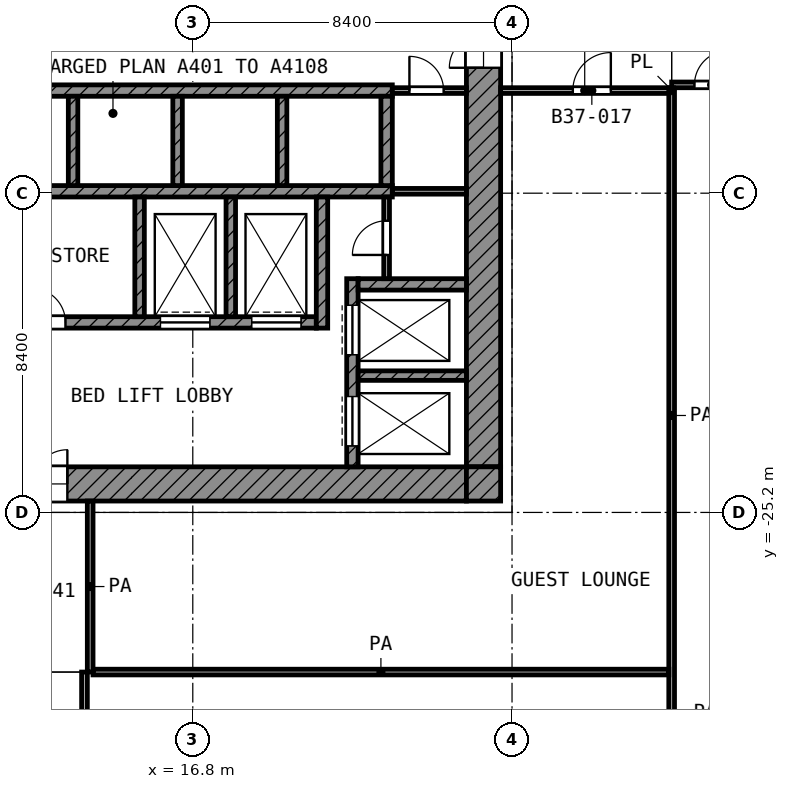
"""IFC4 building model, lengths in metres.
Left out: names, types, materials, properties, quantities, classifications, styles, units other than length and angle.
Written with IfcOpenShell. Run it as: python <this file> out.ifc"""

import sys

from ifc_helpers import new_model, si_unit, direction, frame, frame_2d, origin, place, context, subcontext, project, spatial, rectangle, extrude, element, fill, save


model = new_model("IFC4")
c1 = context("Model", 3, precision=1e-05, world=origin(), true_north=direction((0.0, 1.0)))
c2 = subcontext(c1, "Body", "Model", "MODEL_VIEW")
j1 = project(units=[si_unit("LENGTHUNIT", "METRE"), si_unit("PLANEANGLEUNIT", "RADIAN")], contexts=[c1])
p1 = place(None, origin())
s1 = spatial("IfcSite", under=j1, at=p1, CompositionType="ELEMENT")
p2 = place(p1, origin())
s2 = spatial("IfcBuilding", under=s1, at=p2, CompositionType="ELEMENT")
p3 = place(p2, frame((0.0, 0.0, 162.6)))
s3 = spatial("IfcBuildingStorey", under=s2, at=p3, CompositionType="ELEMENT", Elevation=162.6)
p4 = place(p3, frame((24.45, -24.0, 0.0), z_axis=(0.0, 0.0, 1.0), x_axis=(0.0, 1.0, 0.0)))
e1 = element("IfcWall", 1, at=p4, inside=s3, PredefinedType="SHEAR", context=c2, shape_type="SweptSolid", body=[
    extrude(rectangle(XDim=18.6, YDim=0.9, at=frame_2d((9.3, 0.0))), origin(), (0.0, 0.0, 1.0), 3.6),
])
p5 = place(p4, frame((10.5, 0.0, 0.0)))
e2 = element("IfcOpeningElement", 2, at=p5, cuts=e1, PredefinedType="OPENING", context=c2, shape_type="SweptSolid", body=[
    extrude(rectangle(XDim=1.8, YDim=2.1, at=frame_2d((0.9, 1.05))), frame((0.0, 0.46, 0.0), z_axis=(0.0, -1.0, 0.0), x_axis=(1.0, 0.0, 0.0)), (0.0, 0.0, 1.0), 0.92),
])
p6 = place(p3, frame((5.4, -24.45, 0.0), z_axis=(0.0, 0.0, 1.0), x_axis=(1.0, 0.0, 0.0)))
e3 = element("IfcWall", 3, at=p6, inside=s3, PredefinedType="SHEAR", context=c2, shape_type="SweptSolid", body=[
    extrude(rectangle(XDim=18.6, YDim=0.9, at=frame_2d((9.3, 0.0))), origin(), (0.0, 0.0, 1.0), 3.6),
])
p7 = place(p6, frame((6.3, 0.0, 0.0)))
e4 = element("IfcOpeningElement", 4, at=p7, cuts=e3, PredefinedType="OPENING", context=c2, shape_type="SweptSolid", body=[
    extrude(rectangle(XDim=1.8, YDim=2.1, at=frame_2d((0.9, 1.05))), frame((0.0, 0.46, 0.0), z_axis=(0.0, -1.0, 0.0), x_axis=(1.0, 0.0, 0.0)), (0.0, 0.0, 1.0), 0.92),
])
p8 = place(p3, frame((24.45, -24.9, 0.0), z_axis=(0.0, 0.0, 1.0), x_axis=(0.0, 1.0, 0.0)))
e5 = element("IfcWall", 5, at=p8, inside=s3, PredefinedType="SHEAR", context=c2, shape_type="SweptSolid", body=[
    extrude(rectangle(XDim=0.9, YDim=0.9, at=frame_2d((0.45, 0.0))), origin(), (0.0, 0.0, 1.0), 3.6),
])
p9 = place(p3, frame((5.4, -14.1, 0.0), z_axis=(0.0, 0.0, 1.0), x_axis=(1.0, 0.0, 0.0)))
e6 = element("IfcWall", 6, at=p9, inside=s3, PredefinedType="SHEAR", context=c2, shape_type="SweptSolid", body=[
    extrude(rectangle(XDim=16.65, YDim=0.3, at=frame_2d((8.325, 0.0))), origin(), (0.0, 0.0, 1.0), 3.6),
])
p10 = place(p9, frame((0.825, 0.0, 0.0)))
e7 = element("IfcOpeningElement", 7, at=p10, cuts=e6, PredefinedType="OPENING", context=c2, shape_type="SweptSolid", body=[
    extrude(rectangle(XDim=1.1, YDim=2.1, at=frame_2d((0.55, 1.05))), frame((0.0, 0.16, 0.0), z_axis=(0.0, -1.0, 0.0), x_axis=(1.0, 0.0, 0.0)), (0.0, 0.0, 1.0), 0.32),
])
p11 = place(p9, frame((3.575, 0.0, 0.0)))
e8 = element("IfcOpeningElement", 8, at=p11, cuts=e6, PredefinedType="OPENING", context=c2, shape_type="SweptSolid", body=[
    extrude(rectangle(XDim=1.1, YDim=2.1, at=frame_2d((0.55, 1.05))), frame((0.0, 0.16, 0.0), z_axis=(0.0, -1.0, 0.0), x_axis=(1.0, 0.0, 0.0)), (0.0, 0.0, 1.0), 0.32),
])
p12 = place(p3, frame((5.4, -16.75, 0.0), z_axis=(0.0, 0.0, 1.0), x_axis=(1.0, 0.0, 0.0)))
e9 = element("IfcWall", 9, at=p12, inside=s3, PredefinedType="SHEAR", context=c2, shape_type="SweptSolid", body=[
    extrude(rectangle(XDim=16.65, YDim=0.3, at=frame_2d((8.325, 0.0))), origin(), (0.0, 0.0, 1.0), 3.6),
])
p13 = place(p3, frame((5.4, -20.2, 0.0), z_axis=(0.0, 0.0, 1.0), x_axis=(1.0, 0.0, 0.0)))
e10 = element("IfcWall", 10, at=p13, inside=s3, PredefinedType="SHEAR", context=c2, shape_type="SweptSolid", body=[
    extrude(rectangle(XDim=14.65, YDim=0.3, at=frame_2d((7.325, 0.0))), origin(), (0.0, 0.0, 1.0), 3.6),
])
p14 = place(p13, frame((10.55, 0.0, 0.0)))
e11 = element("IfcOpeningElement", 11, at=p14, cuts=e10, PredefinedType="OPENING", context=c2, shape_type="SweptSolid", body=[
    extrude(rectangle(XDim=1.3, YDim=2.1, at=frame_2d((0.65, 1.05))), frame((0.0, 0.16, 0.0), z_axis=(0.0, -1.0, 0.0), x_axis=(1.0, 0.0, 0.0)), (0.0, 0.0, 1.0), 0.32),
])
p15 = place(p13, frame((12.95, 0.0, 0.0)))
e12 = element("IfcOpeningElement", 12, at=p15, cuts=e10, PredefinedType="OPENING", context=c2, shape_type="SweptSolid", body=[
    extrude(rectangle(XDim=1.3, YDim=2.1, at=frame_2d((0.65, 1.05))), frame((0.0, 0.16, 0.0), z_axis=(0.0, -1.0, 0.0), x_axis=(1.0, 0.0, 0.0)), (0.0, 0.0, 1.0), 0.32),
])
p16 = place(p13, frame((0.55, 0.0, 0.0)))
e13 = element("IfcOpeningElement", 13, at=p16, cuts=e10, PredefinedType="OPENING", context=c2, shape_type="SweptSolid", body=[
    extrude(rectangle(XDim=1.3, YDim=2.1, at=frame_2d((0.65, 1.05))), frame((0.0, 0.16, 0.0), z_axis=(0.0, -1.0, 0.0), x_axis=(1.0, 0.0, 0.0)), (0.0, 0.0, 1.0), 0.32),
])
p17 = place(p13, frame((2.95, 0.0, 0.0)))
e14 = element("IfcOpeningElement", 14, at=p17, cuts=e10, PredefinedType="OPENING", context=c2, shape_type="SweptSolid", body=[
    extrude(rectangle(XDim=1.3, YDim=2.1, at=frame_2d((0.65, 1.05))), frame((0.0, 0.16, 0.0), z_axis=(0.0, -1.0, 0.0), x_axis=(1.0, 0.0, 0.0)), (0.0, 0.0, 1.0), 0.32),
])
p18 = place(p13, frame((7.15, 0.0, 0.0)))
e15 = element("IfcOpeningElement", 15, at=p18, cuts=e10, PredefinedType="OPENING", context=c2, shape_type="SweptSolid", body=[
    extrude(rectangle(XDim=0.9, YDim=2.1, at=frame_2d((0.45, 1.05))), frame((0.0, 0.16, 0.0), z_axis=(0.0, -1.0, 0.0), x_axis=(1.0, 0.0, 0.0)), (0.0, 0.0, 1.0), 0.32),
])
p19 = place(p3, frame((20.2, -20.35, 0.0), z_axis=(0.0, 0.0, 1.0), x_axis=(0.0, 1.0, 0.0)))
e16 = element("IfcWall", 16, at=p19, inside=s3, PredefinedType="SHEAR", context=c2, shape_type="SweptSolid", body=[
    extrude(rectangle(XDim=3.45, YDim=0.3, at=frame_2d((1.725, 0.0))), origin(), (0.0, 0.0, 1.0), 3.6),
])
p20 = place(p3, frame((21.9, -16.6, 0.0), z_axis=(0.0, 0.0, 1.0), x_axis=(0.0, 1.0, 0.0)))
e17 = element("IfcWall", 17, at=p20, inside=s3, PredefinedType="SHEAR", context=c2, shape_type="SweptSolid", body=[
    extrude(rectangle(XDim=2.35, YDim=0.3, at=frame_2d((1.175, 0.0))), origin(), (0.0, 0.0, 1.0), 3.6),
])
p21 = place(p3, frame((21.15, -19.2, 0.0), z_axis=(0.0, 0.0, 1.0), x_axis=(1.0, 0.0, 0.0)))
e18 = element("IfcWall", 18, at=p21, inside=s3, PredefinedType="SHEAR", context=c2, shape_type="SweptSolid", body=[
    extrude(rectangle(XDim=2.85, YDim=0.3, at=frame_2d((1.425, 0.0))), origin(), (0.0, 0.0, 1.0), 3.6),
])
p22 = place(p3, frame((21.0, -24.0, 0.0), z_axis=(0.0, 0.0, 1.0), x_axis=(0.0, 1.0, 0.0)))
e19 = element("IfcWall", 19, at=p22, inside=s3, PredefinedType="SHEAR", context=c2, shape_type="SweptSolid", body=[
    extrude(rectangle(XDim=4.95, YDim=0.3, at=frame_2d((2.475, 0.0))), origin(), (0.0, 0.0, 1.0), 3.6),
])
p23 = place(p22, frame((2.95, 0.0, 0.0)))
e20 = element("IfcOpeningElement", 20, at=p23, cuts=e19, PredefinedType="OPENING", context=c2, shape_type="SweptSolid", body=[
    extrude(rectangle(XDim=1.3, YDim=2.1, at=frame_2d((0.65, 1.05))), frame((0.0, 0.16, 0.0), z_axis=(0.0, -1.0, 0.0), x_axis=(1.0, 0.0, 0.0)), (0.0, 0.0, 1.0), 0.32),
])
p24 = place(p22, frame((0.55, 0.0, 0.0)))
e21 = element("IfcOpeningElement", 21, at=p24, cuts=e19, PredefinedType="OPENING", context=c2, shape_type="SweptSolid", body=[
    extrude(rectangle(XDim=1.3, YDim=2.1, at=frame_2d((0.65, 1.05))), frame((0.0, 0.16, 0.0), z_axis=(0.0, -1.0, 0.0), x_axis=(1.0, 0.0, 0.0)), (0.0, 0.0, 1.0), 0.32),
])
p25 = place(p3, frame((21.15, -21.6, 0.0), z_axis=(0.0, 0.0, 1.0), x_axis=(1.0, 0.0, 0.0)))
e22 = element("IfcWall", 22, at=p25, inside=s3, PredefinedType="SHEAR", context=c2, shape_type="SweptSolid", body=[
    extrude(rectangle(XDim=2.85, YDim=0.25, at=frame_2d((1.425, 0.0))), origin(), (0.0, 0.0, 1.0), 3.6),
])
for number, where, z_axis, x_axis in (
    (23, (15.4, -20.05, 0.0), (0.0, 0.0, 1.0), (0.0, 1.0, 0.0)),
    (24, (17.8, -20.05, 0.0), (0.0, 0.0, 1.0), (0.0, 1.0, 0.0)),
):
    element("IfcWall", number, at=place(p3, frame(where, z_axis=z_axis, x_axis=x_axis)), inside=s3, PredefinedType="SHEAR", context=c2, shape_type="SweptSolid", body=[
        extrude(rectangle(XDim=3.15, YDim=0.25, at=frame_2d((1.575, 0.0))), origin(), (0.0, 0.0, 1.0), 3.6),
    ])
for number, where, z_axis, x_axis in (
    (25, (13.65, -16.6, 0.0), (0.0, 0.0, 1.0), (0.0, 1.0, 0.0)),
    (26, (16.4, -16.6, 0.0), (0.0, 0.0, 1.0), (0.0, 1.0, 0.0)),
    (27, (19.15, -16.6, 0.0), (0.0, 0.0, 1.0), (0.0, 1.0, 0.0)),
):
    element("IfcWall", number, at=place(p3, frame(where, z_axis=z_axis, x_axis=x_axis)), inside=s3, PredefinedType="SHEAR", context=c2, shape_type="SweptSolid", body=[
        extrude(rectangle(XDim=2.35, YDim=0.25, at=frame_2d((1.175, 0.0))), origin(), (0.0, 0.0, 1.0), 3.6),
    ])
p26 = place(p3, frame((21.9, -19.05, 0.0), z_axis=(0.0, 0.0, 1.0), x_axis=(0.0, 1.0, 0.0)))
e28 = element("IfcWall", 28, at=p26, inside=s3, PredefinedType="PARTITIONING", context=c2, shape_type="SweptSolid", body=[
    extrude(rectangle(XDim=2.15, YDim=0.15, at=frame_2d((1.075, 0.0))), origin(), (0.0, 0.0, 1.0), 3.6),
])
p27 = place(p26, frame((0.625, 0.0, 0.0)))
e29 = element("IfcOpeningElement", 29, at=p27, cuts=e28, PredefinedType="OPENING", context=c2, shape_type="SweptSolid", body=[
    extrude(rectangle(XDim=0.9, YDim=2.1, at=frame_2d((0.45, 1.05))), frame((0.0, 0.085, 0.0), z_axis=(0.0, -1.0, 0.0), x_axis=(1.0, 0.0, 0.0)), (0.0, 0.0, 1.0), 0.17),
])
p28 = place(p3, frame((22.05, -16.75, 0.0), z_axis=(0.0, 0.0, 1.0), x_axis=(1.0, 0.0, 0.0)))
e30 = element("IfcWall", 30, at=p28, inside=s3, PredefinedType="PARTITIONING", context=c2, shape_type="SweptSolid", body=[
    extrude(rectangle(XDim=1.95, YDim=0.15, at=frame_2d((0.975, 0.0))), origin(), (0.0, 0.0, 1.0), 3.6),
])
p29 = place(p3, frame((22.05, -14.1, 0.0), z_axis=(0.0, 0.0, 1.0), x_axis=(1.0, 0.0, 0.0)))
e31 = element("IfcWall", 31, at=p29, inside=s3, PredefinedType="PARTITIONING", context=c2, shape_type="SweptSolid", body=[
    extrude(rectangle(XDim=1.95, YDim=0.15, at=frame_2d((0.975, 0.0))), origin(), (0.0, 0.0, 1.0), 3.6),
])
p30 = place(p29, frame((0.45, 0.0, 0.0)))
e32 = element("IfcOpeningElement", 32, at=p30, cuts=e31, PredefinedType="OPENING", context=c2, shape_type="SweptSolid", body=[
    extrude(rectangle(XDim=0.9, YDim=2.1, at=frame_2d((0.45, 1.05))), frame((0.0, 0.085, 0.0), z_axis=(0.0, -1.0, 0.0), x_axis=(1.0, 0.0, 0.0)), (0.0, 0.0, 1.0), 0.17),
])
p31 = place(p3, frame((29.4, -14.147, 0.0), z_axis=(0.0, 0.0, 1.0), x_axis=(0.0, 1.0, 0.0)))
e33 = element("IfcWall", 33, at=p31, inside=s3, PredefinedType="PARTITIONING", context=c2, shape_type="SweptSolid", body=[
    extrude(rectangle(XDim=0.12, YDim=0.1, at=frame_2d((0.06, 0.0))), origin(), (0.0, 0.0, 1.0), 3.6),
])
p32 = place(p3, frame((14.175, -29.4, 0.0), z_axis=(0.0, 0.0, 1.0), x_axis=(1.0, 0.0, 0.0)))
e34 = element("IfcWall", 34, at=p32, inside=s3, PredefinedType="PARTITIONING", context=c2, shape_type="SweptSolid", body=[
    extrude(rectangle(XDim=15.15, YDim=0.15, at=frame_2d((7.575, 0.0))), origin(), (0.0, 0.0, 1.0), 3.6),
])
p33 = place(p3, frame((24.9, -14.1, 0.0), z_axis=(0.0, 0.0, 1.0), x_axis=(1.0, 0.0, 0.0)))
e35 = element("IfcWall", 35, at=p33, inside=s3, PredefinedType="PARTITIONING", context=c2, shape_type="SweptSolid", body=[
    extrude(rectangle(XDim=4.425, YDim=0.15, at=frame_2d((2.212, 0.0))), origin(), (0.0, 0.0, 1.0), 3.6),
])
p34 = place(p33, frame((1.9, 0.0, 0.0)))
e36 = element("IfcOpeningElement", 36, at=p34, cuts=e35, PredefinedType="OPENING", context=c2, shape_type="SweptSolid", body=[
    extrude(rectangle(XDim=1.0, YDim=2.1, at=frame_2d((0.5, 1.05))), frame((0.0, 0.085, 0.0), z_axis=(0.0, -1.0, 0.0), x_axis=(1.0, 0.0, 0.0)), (0.0, 0.0, 1.0), 0.17),
])
p35 = place(p3, frame((29.4, -13.95, 0.0), z_axis=(0.0, 0.0, 1.0), x_axis=(1.0, 0.0, 0.0)))
e37 = element("IfcWall", 37, at=p35, inside=s3, PredefinedType="PARTITIONING", context=c2, shape_type="SweptSolid", body=[
    extrude(rectangle(XDim=37.72, YDim=0.15, at=frame_2d((18.86, 0.0))), origin(), (0.0, 0.0, 1.0), 3.6),
])
p36 = place(p35, frame((14.6, 0.0, 0.0)))
e38 = element("IfcOpeningElement", 38, at=p36, cuts=e37, PredefinedType="OPENING", context=c2, shape_type="SweptSolid", body=[
    extrude(rectangle(XDim=1.0, YDim=2.1, at=frame_2d((0.5, 1.05))), frame((0.0, 0.085, 0.0), z_axis=(0.0, -1.0, 0.0), x_axis=(1.0, 0.0, 0.0)), (0.0, 0.0, 1.0), 0.17),
])
p37 = place(p35, frame((12.3, 0.0, 0.0)))
e39 = element("IfcOpeningElement", 39, at=p37, cuts=e37, PredefinedType="OPENING", context=c2, shape_type="SweptSolid", body=[
    extrude(rectangle(XDim=1.0, YDim=2.1, at=frame_2d((0.5, 1.05))), frame((0.0, 0.085, 0.0), z_axis=(0.0, -1.0, 0.0), x_axis=(1.0, 0.0, 0.0)), (0.0, 0.0, 1.0), 0.17),
])
p38 = place(p35, frame((18.7, 0.0, 0.0)))
e40 = element("IfcOpeningElement", 40, at=p38, cuts=e37, PredefinedType="OPENING", context=c2, shape_type="SweptSolid", body=[
    extrude(rectangle(XDim=1.0, YDim=2.1, at=frame_2d((0.5, 1.05))), frame((0.0, 0.085, 0.0), z_axis=(0.0, -1.0, 0.0), x_axis=(1.0, 0.0, 0.0)), (0.0, 0.0, 1.0), 0.17),
])
p39 = place(p35, frame((22.6, 0.0, 0.0)))
e41 = element("IfcOpeningElement", 41, at=p39, cuts=e37, PredefinedType="OPENING", context=c2, shape_type="SweptSolid", body=[
    extrude(rectangle(XDim=1.0, YDim=2.1, at=frame_2d((0.5, 1.05))), frame((0.0, 0.085, 0.0), z_axis=(0.0, -1.0, 0.0), x_axis=(1.0, 0.0, 0.0)), (0.0, 0.0, 1.0), 0.17),
])
p40 = place(p35, frame((26.8, 0.0, 0.0)))
e42 = element("IfcOpeningElement", 42, at=p40, cuts=e37, PredefinedType="OPENING", context=c2, shape_type="SweptSolid", body=[
    extrude(rectangle(XDim=1.0, YDim=2.1, at=frame_2d((0.5, 1.05))), frame((0.0, 0.085, 0.0), z_axis=(0.0, -1.0, 0.0), x_axis=(1.0, 0.0, 0.0)), (0.0, 0.0, 1.0), 0.17),
])
p41 = place(p35, frame((36.0, 0.0, 0.0)))
e43 = element("IfcOpeningElement", 43, at=p41, cuts=e37, PredefinedType="OPENING", context=c2, shape_type="SweptSolid", body=[
    extrude(rectangle(XDim=1.0, YDim=2.1, at=frame_2d((0.5, 1.05))), frame((0.0, 0.085, 0.0), z_axis=(0.0, -1.0, 0.0), x_axis=(1.0, 0.0, 0.0)), (0.0, 0.0, 1.0), 0.17),
])
p42 = place(p35, frame((34.7, 0.0, 0.0)))
e44 = element("IfcOpeningElement", 44, at=p42, cuts=e37, PredefinedType="OPENING", context=c2, shape_type="SweptSolid", body=[
    extrude(rectangle(XDim=1.0, YDim=2.1, at=frame_2d((0.5, 1.05))), frame((0.0, 0.085, 0.0), z_axis=(0.0, -1.0, 0.0), x_axis=(1.0, 0.0, 0.0)), (0.0, 0.0, 1.0), 0.17),
])
p43 = place(p35, frame((0.6, 0.0, 0.0)))
e45 = element("IfcOpeningElement", 45, at=p43, cuts=e37, PredefinedType="OPENING", context=c2, shape_type="SweptSolid", body=[
    extrude(rectangle(XDim=0.9, YDim=2.1, at=frame_2d((0.45, 1.05))), frame((0.0, 0.085, 0.0), z_axis=(0.0, -1.0, 0.0), x_axis=(1.0, 0.0, 0.0)), (0.0, 0.0, 1.0), 0.17),
])
p44 = place(p35, frame((2.65, 0.0, 0.0)))
e46 = element("IfcOpeningElement", 46, at=p44, cuts=e37, PredefinedType="OPENING", context=c2, shape_type="SweptSolid", body=[
    extrude(rectangle(XDim=1.0, YDim=2.1, at=frame_2d((0.5, 1.05))), frame((0.0, 0.085, 0.0), z_axis=(0.0, -1.0, 0.0), x_axis=(1.0, 0.0, 0.0)), (0.0, 0.0, 1.0), 0.17),
])
p45 = place(p35, frame((5.55, 0.0, 0.0)))
e47 = element("IfcOpeningElement", 47, at=p45, cuts=e37, PredefinedType="OPENING", context=c2, shape_type="SweptSolid", body=[
    extrude(rectangle(XDim=1.5, YDim=2.1, at=frame_2d((0.75, 1.05))), frame((0.0, 0.085, 0.0), z_axis=(0.0, -1.0, 0.0), x_axis=(1.0, 0.0, 0.0)), (0.0, 0.0, 1.0), 0.17),
])
p46 = place(p3, frame((13.95, -58.72, 0.0), z_axis=(0.0, 0.0, 1.0), x_axis=(0.0, 1.0, 0.0)))
e48 = element("IfcWall", 48, at=p46, inside=s3, PredefinedType="PARTITIONING", context=c2, shape_type="SweptSolid", body=[
    extrude(rectangle(XDim=29.32, YDim=0.15, at=frame_2d((14.66, 0.0))), origin(), (0.0, 0.0, 1.0), 3.6),
])
p47 = place(p46, frame((24.37, 0.0, 0.0)))
e49 = element("IfcOpeningElement", 49, at=p47, cuts=e48, PredefinedType="OPENING", context=c2, shape_type="SweptSolid", body=[
    extrude(rectangle(XDim=1.5, YDim=2.1, at=frame_2d((0.75, 1.05))), frame((0.0, 0.085, 0.0), z_axis=(0.0, -1.0, 0.0), x_axis=(1.0, 0.0, 0.0)), (0.0, 0.0, 1.0), 0.17),
])
p48 = place(p46, frame((17.62, 0.0, 0.0)))
e50 = element("IfcOpeningElement", 50, at=p48, cuts=e48, PredefinedType="OPENING", context=c2, shape_type="SweptSolid", body=[
    extrude(rectangle(XDim=1.0, YDim=2.1, at=frame_2d((0.5, 1.05))), frame((0.0, 0.085, 0.0), z_axis=(0.0, -1.0, 0.0), x_axis=(1.0, 0.0, 0.0)), (0.0, 0.0, 1.0), 0.17),
])
p49 = place(p46, frame((15.32, 0.0, 0.0)))
e51 = element("IfcOpeningElement", 51, at=p49, cuts=e48, PredefinedType="OPENING", context=c2, shape_type="SweptSolid", body=[
    extrude(rectangle(XDim=1.0, YDim=2.1, at=frame_2d((0.5, 1.05))), frame((0.0, 0.085, 0.0), z_axis=(0.0, -1.0, 0.0), x_axis=(1.0, 0.0, 0.0)), (0.0, 0.0, 1.0), 0.17),
])
p50 = place(p46, frame((5.17, 0.0, 0.0)))
e52 = element("IfcOpeningElement", 52, at=p50, cuts=e48, PredefinedType="OPENING", context=c2, shape_type="SweptSolid", body=[
    extrude(rectangle(XDim=1.5, YDim=2.1, at=frame_2d((0.75, 1.05))), frame((0.0, 0.085, 0.0), z_axis=(0.0, -1.0, 0.0), x_axis=(1.0, 0.0, 0.0)), (0.0, 0.0, 1.0), 0.17),
])
p51 = place(p3, frame((14.1, -29.4, 0.0), z_axis=(0.0, 0.0, 1.0), x_axis=(0.0, 1.0, 0.0)))
e53 = element("IfcWall", 53, at=p51, inside=s3, PredefinedType="PARTITIONING", context=c2, shape_type="SweptSolid", body=[
    extrude(rectangle(XDim=4.5, YDim=0.15, at=frame_2d((2.25, 0.0))), origin(), (0.0, 0.0, 1.0), 3.6),
])
p52 = place(p3, frame((29.4, -31.198, 0.0), z_axis=(0.0, 0.0, 1.0), x_axis=(0.0, 1.0, 0.0)))
e54 = element("IfcWall", 54, at=p52, inside=s3, PredefinedType="PARTITIONING", context=c2, shape_type="SweptSolid", body=[
    extrude(rectangle(XDim=17.098, YDim=0.15, at=frame_2d((8.549, 0.0))), origin(), (0.0, 0.0, 1.0), 3.6),
])
p53 = place(p23, origin())
e55 = element("IfcDoor", 55, at=p53, inside=s3, OperationType="DOUBLE_DOOR_SLIDING", PredefinedType="DOOR", context=c2, shape_type="SweptSolid", body=[
    extrude(rectangle(XDim=1.3, YDim=2.1, at=frame_2d((0.65, 1.05))), frame((0.0, 0.025, 0.0), z_axis=(0.0, -1.0, 0.0), x_axis=(1.0, 0.0, 0.0)), (0.0, 0.0, 1.0), 0.05),
])
fill(e20, e55)
p54 = place(p24, origin())
e56 = element("IfcDoor", 56, at=p54, inside=s3, OperationType="DOUBLE_DOOR_SLIDING", PredefinedType="DOOR", context=c2, shape_type="SweptSolid", body=[
    extrude(rectangle(XDim=1.3, YDim=2.1, at=frame_2d((0.65, 1.05))), frame((0.0, 0.025, 0.0), z_axis=(0.0, -1.0, 0.0), x_axis=(1.0, 0.0, 0.0)), (0.0, 0.0, 1.0), 0.05),
])
fill(e21, e56)
p55 = place(p14, origin())
e57 = element("IfcDoor", 57, at=p55, inside=s3, OperationType="DOUBLE_DOOR_SLIDING", PredefinedType="DOOR", context=c2, shape_type="SweptSolid", body=[
    extrude(rectangle(XDim=1.3, YDim=2.1, at=frame_2d((0.65, 1.05))), frame((0.0, 0.025, 0.0), z_axis=(0.0, -1.0, 0.0), x_axis=(1.0, 0.0, 0.0)), (0.0, 0.0, 1.0), 0.05),
])
fill(e11, e57)
p56 = place(p15, origin())
e58 = element("IfcDoor", 58, at=p56, inside=s3, OperationType="DOUBLE_DOOR_SLIDING", PredefinedType="DOOR", context=c2, shape_type="SweptSolid", body=[
    extrude(rectangle(XDim=1.3, YDim=2.1, at=frame_2d((0.65, 1.05))), frame((0.0, 0.025, 0.0), z_axis=(0.0, -1.0, 0.0), x_axis=(1.0, 0.0, 0.0)), (0.0, 0.0, 1.0), 0.05),
])
fill(e12, e58)
p57 = place(p5, origin())
e59 = element("IfcDoor", 59, at=p57, inside=s3, OperationType="DOUBLE_DOOR_SINGLE_SWING", PredefinedType="DOOR", context=c2, shape_type="SweptSolid", body=[
    extrude(rectangle(XDim=1.8, YDim=2.1, at=frame_2d((0.9, 1.05))), frame((0.0, 0.025, 0.0), z_axis=(0.0, -1.0, 0.0), x_axis=(1.0, 0.0, 0.0)), (0.0, 0.0, 1.0), 0.05),
])
fill(e2, e59)
p58 = place(p7, origin())
e60 = element("IfcDoor", 60, at=p58, inside=s3, OperationType="DOUBLE_DOOR_SINGLE_SWING", PredefinedType="DOOR", context=c2, shape_type="SweptSolid", body=[
    extrude(rectangle(XDim=1.8, YDim=2.1, at=frame_2d((0.9, 1.05))), frame((0.0, 0.025, 0.0), z_axis=(0.0, -1.0, 0.0), x_axis=(1.0, 0.0, 0.0)), (0.0, 0.0, 1.0), 0.05),
])
fill(e4, e60)
p59 = place(p30, origin())
e61 = element("IfcDoor", 61, at=p59, inside=s3, OperationType="SINGLE_SWING_LEFT", PredefinedType="DOOR", context=c2, shape_type="SweptSolid", body=[
    extrude(rectangle(XDim=0.9, YDim=2.1, at=frame_2d((0.45, 1.05))), frame((0.0, 0.025, 0.0), z_axis=(0.0, -1.0, 0.0), x_axis=(1.0, 0.0, 0.0)), (0.0, 0.0, 1.0), 0.05),
])
fill(e32, e61)
p60 = place(p27, origin())
e62 = element("IfcDoor", 62, at=p60, inside=s3, OperationType="SINGLE_SWING_LEFT", PredefinedType="DOOR", context=c2, shape_type="SweptSolid", body=[
    extrude(rectangle(XDim=0.9, YDim=2.1, at=frame_2d((0.45, 1.05))), frame((0.0, 0.025, 0.0), z_axis=(0.0, -1.0, 0.0), x_axis=(1.0, 0.0, 0.0)), (0.0, 0.0, 1.0), 0.05),
])
fill(e29, e62)
p61 = place(p18, origin())
e63 = element("IfcDoor", 63, at=p61, inside=s3, OperationType="SINGLE_SWING_LEFT", PredefinedType="DOOR", context=c2, shape_type="SweptSolid", body=[
    extrude(rectangle(XDim=0.9, YDim=2.1, at=frame_2d((0.45, 1.05))), frame((0.0, 0.025, 0.0), z_axis=(0.0, -1.0, 0.0), x_axis=(1.0, 0.0, 0.0)), (0.0, 0.0, 1.0), 0.05),
])
fill(e15, e63)
p62 = place(p34, origin())
e64 = element("IfcDoor", 64, at=p62, inside=s3, OperationType="SINGLE_SWING_RIGHT", PredefinedType="DOOR", context=c2, shape_type="SweptSolid", body=[
    extrude(rectangle(XDim=1.0, YDim=2.1, at=frame_2d((0.5, 1.05))), frame((0.0, 0.025, 0.0), z_axis=(0.0, -1.0, 0.0), x_axis=(1.0, 0.0, 0.0)), (0.0, 0.0, 1.0), 0.05),
])
fill(e36, e64)
p63 = place(p43, origin())
e65 = element("IfcDoor", 65, at=p63, inside=s3, OperationType="SINGLE_SWING_RIGHT", PredefinedType="DOOR", context=c2, shape_type="SweptSolid", body=[
    extrude(rectangle(XDim=0.9, YDim=2.1, at=frame_2d((0.45, 1.05))), frame((0.0, 0.025, 0.0), z_axis=(0.0, -1.0, 0.0), x_axis=(1.0, 0.0, 0.0)), (0.0, 0.0, 1.0), 0.05),
])
fill(e45, e65)
save(model, sys.argv[1])
